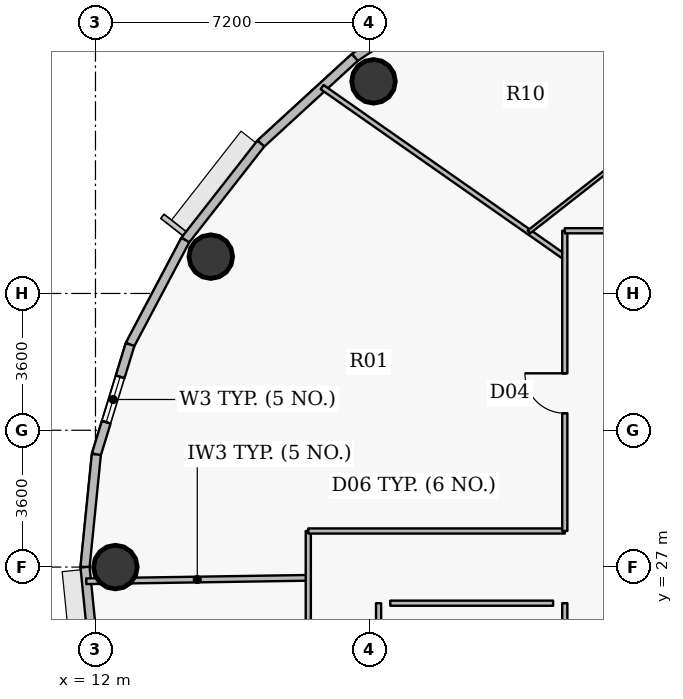
"""IFC4 building model, lengths in metres.
Left out: names, types, materials, properties, quantities, classifications, styles, units other than length and angle.
Written with IfcOpenShell. Run it as: python <this file> out.ifc"""

import sys

from ifc_helpers import new_model, si_unit, direction, frame, frame_2d, origin, origin_2d, place, context, subcontext, project, spatial, rectangle, hollow_circle, extrude, source, transform, mapped, element, fill, save


model = new_model("IFC4")
c1 = context("Model", 3, precision=1e-05, world=origin(), true_north=direction((0.0, 1.0)))
c2 = subcontext(c1, "Body", "Model", "MODEL_VIEW")
j1 = project(units=[si_unit("LENGTHUNIT", "METRE"), si_unit("PLANEANGLEUNIT", "RADIAN")], contexts=[c1])
p1 = place(None, origin())
s1 = spatial("IfcSite", under=j1, at=p1, CompositionType="ELEMENT")
p2 = place(p1, origin())
s2 = spatial("IfcBuilding", under=s1, at=p2, CompositionType="ELEMENT")
p3 = place(p2, frame((0.0, 0.0, 255.3)))
s3 = spatial("IfcBuildingStorey", under=s2, at=p3, CompositionType="ELEMENT", Elevation=255.3)
for number, where, z_axis, x_axis in (
    (1, (19.317, 39.781, 0.0), (0.0, 0.0, 1.0), (1.0, 0.0, 0.0)),
    (2, (15.035, 35.169, 0.0), (0.0, 0.0, 1.0), (1.0, 0.0, 0.0)),
    (3, (12.525, 27.0, 0.0), (0.0, 0.0, 1.0), (1.0, 0.0, 0.0)),
):
    element("IfcColumn", number, at=place(p3, frame(where, z_axis=z_axis, x_axis=x_axis)), inside=s3, PredefinedType="COLUMN", context=c2, shape_type="SweptSolid", body=[
        extrude(hollow_circle(Radius=0.575, WallThickness=0.036, at=origin_2d()), origin(), (0.0, 0.0, 1.0), 3.75),
    ])
p4 = place(p3, frame((18.824, 40.411, 0.0), z_axis=(0.0, 0.0, 1.0), x_axis=(0.831262496074, 0.555880079352, 0.0)))
e4 = element("IfcWall", 4, at=p4, inside=s3, PredefinedType="SOLIDWALL", context=c2, shape_type="SweptSolid", body=[
    extrude(rectangle(XDim=3.484, YDim=0.24, at=frame_2d((1.742, 0.0))), origin(), (0.0, 0.0, 1.0), 3.5),
])
p5 = place(p3, frame((16.352, 38.145, 0.0), z_axis=(0.0, 0.0, 1.0), x_axis=(0.737123922599, 0.675757591694, 0.0)))
e5 = element("IfcWall", 5, at=p5, inside=s3, PredefinedType="SOLIDWALL", context=c2, shape_type="SweptSolid", body=[
    extrude(rectangle(XDim=3.354, YDim=0.24, at=frame_2d((1.677, 0.0))), origin(), (0.0, 0.0, 1.0), 3.5),
])
p6 = place(p3, frame((14.364, 35.605, 0.0), z_axis=(0.0, 0.0, 1.0), x_axis=(0.616312344705, 0.787501805562, 0.0)))
e6 = element("IfcWall", 6, at=p6, inside=s3, PredefinedType="SOLIDWALL", context=c2, shape_type="SweptSolid", body=[
    extrude(rectangle(XDim=3.225, YDim=0.24, at=frame_2d((1.612, 0.0))), origin(), (0.0, 0.0, 1.0), 3.5),
])
p7 = place(p3, frame((12.91, 32.856, 0.0), z_axis=(0.0, 0.0, 1.0), x_axis=(0.46766049993, 0.883908172157, 0.0)))
e7 = element("IfcWall", 7, at=p7, inside=s3, PredefinedType="SOLIDWALL", context=c2, shape_type="SweptSolid", body=[
    extrude(rectangle(XDim=3.11, YDim=0.24, at=frame_2d((1.555, 0.0))), origin(), (0.0, 0.0, 1.0), 3.5),
])
p8 = place(p3, frame((12.023, 29.964, 0.0), z_axis=(0.0, 0.0, 1.0), x_axis=(0.293132907334, 0.95607170162, 0.0)))
e8 = element("IfcWall", 8, at=p8, inside=s3, PredefinedType="SOLIDWALL", context=c2, shape_type="SweptSolid", body=[
    extrude(rectangle(XDim=3.025, YDim=0.24, at=frame_2d((1.512, 0.0))), origin(), (0.0, 0.0, 1.0), 3.5),
])
p9 = place(p8, frame((0.887, 0.0, 0.9)))
e9 = element("IfcOpeningElement", 9, at=p9, cuts=e8, PredefinedType="OPENING", context=c2, shape_type="SweptSolid", body=[
    extrude(rectangle(XDim=1.25, YDim=1.65, at=origin_2d()), frame((0.625, 0.13, 0.825), z_axis=(0.0, -1.0, 0.0), x_axis=(1.0, 0.0, 0.0)), (0.0, 0.0, 1.0), 0.26),
])
for number, where, z_axis, x_axis in (
    (10, (11.725, 27.0, 0.0), (0.0, 0.0, 1.0), (0.1, 0.995, 0.0)),
    (11, (12.023, 24.036, 0.0), (0.0, 0.0, 1.0), (-0.1, 0.995, 0.0)),
):
    element("IfcWall", number, at=place(p3, frame(where, z_axis=z_axis, x_axis=x_axis)), inside=s3, PredefinedType="SOLIDWALL", context=c2, shape_type="SweptSolid", body=[
        extrude(rectangle(XDim=2.979, YDim=0.24, at=frame_2d((1.489, 0.0))), origin(), (0.0, 0.0, 1.0), 3.5),
    ])
p10 = place(p3, frame((11.757, 26.628, 0.0), z_axis=(0.0, 0.0, 1.0), x_axis=(0.999882437841, 0.015333313333, 0.0)))
e12 = element("IfcWall", 12, at=p10, inside=s3, PredefinedType="PARTITIONING", context=c2, shape_type="SweptSolid", body=[
    extrude(rectangle(XDim=5.844, YDim=0.15, at=frame_2d((2.922, 0.0))), origin(), (0.0, 0.0, 1.0), 2.985),
])
p11 = place(p3, frame((17.6, 23.423, 0.0), z_axis=(0.0, 0.0, 1.0), x_axis=(0.0, 1.0, 0.0)))
e13 = element("IfcWall", 13, at=p11, inside=s3, PredefinedType="PARTITIONING", context=c2, shape_type="SweptSolid", body=[
    extrude(rectangle(XDim=4.527, YDim=0.135, at=frame_2d((2.263, 0.0))), origin(), (0.0, 0.0, 1.0), 2.935),
])
p12 = place(p11, frame((1.257, 0.0, 0.0)))
e14 = element("IfcOpeningElement", 14, at=p12, cuts=e13, PredefinedType="OPENING", context=c2, shape_type="SweptSolid", body=[
    extrude(rectangle(XDim=0.82, YDim=2.1, at=origin_2d()), frame((0.41, 0.078, 1.05), z_axis=(0.0, -1.0, 0.0), x_axis=(1.0, 0.0, 0.0)), (0.0, 0.0, 1.0), 0.155),
])
p13 = place(p3, frame((17.6, 27.95, 0.0), z_axis=(0.0, 0.0, 1.0), x_axis=(1.0, 0.0, 0.0)))
e15 = element("IfcWall", 15, at=p13, inside=s3, PredefinedType="PARTITIONING", context=c2, shape_type="SweptSolid", body=[
    extrude(rectangle(XDim=6.75, YDim=0.135, at=frame_2d((3.375, 0.0))), origin(), (0.0, 0.0, 1.0), 3.5),
])
p14 = place(p3, frame((17.964, 39.629, 0.0), z_axis=(0.0, 0.0, 1.0), x_axis=(0.819162769896, -0.573561118292, 0.0)))
e16 = element("IfcWall", 16, at=p14, inside=s3, PredefinedType="PARTITIONING", context=c2, shape_type="SweptSolid", body=[
    extrude(rectangle(XDim=7.796, YDim=0.135, at=frame_2d((3.898, 0.0))), origin(), (0.0, 0.0, 1.0), 2.985),
])
p15 = place(p3, frame((23.406, 35.819, 0.0), z_axis=(0.0, 0.0, 1.0), x_axis=(0.787387506959, 0.616458363465, 0.0)))
e17 = element("IfcWall", 17, at=p15, inside=s3, PredefinedType="PARTITIONING", context=c2, shape_type="SweptSolid", body=[
    extrude(rectangle(XDim=3.245, YDim=0.1, at=frame_2d((1.623, 0.0))), origin(), (0.0, 0.0, 1.0), 2.935),
])
p16 = place(p3, frame((24.35, 27.95, 0.0), z_axis=(0.0, 0.0, 1.0), x_axis=(0.0, 1.0, 0.0)))
e18 = element("IfcWall", 18, at=p16, inside=s3, PredefinedType="PARTITIONING", context=c2, shape_type="SweptSolid", body=[
    extrude(rectangle(XDim=7.9, YDim=0.135, at=frame_2d((3.95, 0.0))), origin(), (0.0, 0.0, 1.0), 2.935),
])
p17 = place(p16, frame((3.099, 0.0, 0.0)))
e19 = element("IfcOpeningElement", 19, at=p17, cuts=e18, PredefinedType="OPENING", context=c2, shape_type="SweptSolid", body=[
    extrude(rectangle(XDim=1.05, YDim=2.15, at=origin_2d()), frame((0.525, 0.078, 1.075), z_axis=(0.0, -1.0, 0.0), x_axis=(1.0, 0.0, 0.0)), (0.0, 0.0, 1.0), 0.155),
])
p18 = place(p3, frame((24.35, 35.85, 0.0), z_axis=(0.0, 0.0, 1.0), x_axis=(1.0, 0.0, 0.0)))
e20 = element("IfcWall", 20, at=p18, inside=s3, PredefinedType="PARTITIONING", context=c2, shape_type="SweptSolid", body=[
    extrude(rectangle(XDim=26.218, YDim=0.135, at=frame_2d((13.109, 0.0))), origin(), (0.0, 0.0, 1.0), 2.935),
])
p19 = place(p18, frame((8.045, 0.0, 0.0)))
e21 = element("IfcOpeningElement", 21, at=p19, cuts=e20, PredefinedType="OPENING", context=c2, shape_type="SweptSolid", body=[
    extrude(rectangle(XDim=1.0, YDim=2.15, at=origin_2d()), frame((0.5, 0.078, 1.075), z_axis=(0.0, -1.0, 0.0), x_axis=(1.0, 0.0, 0.0)), (0.0, 0.0, 1.0), 0.155),
])
p20 = place(p3, frame((25.086, 43.95, 0.0), z_axis=(0.0, 0.0, 1.0), x_axis=(0.54137931016, -0.840778474112, 0.0)))
e22 = element("IfcWall", 22, at=p20, inside=s3, PredefinedType="PARTITIONING", context=c2, shape_type="SweptSolid", body=[
    extrude(rectangle(XDim=6.131, YDim=0.1, at=frame_2d((3.066, 0.0))), origin(), (0.0, 0.0, 1.0), 2.985),
])
p21 = place(p20, frame((2.615, 0.0, 0.0)))
e23 = element("IfcOpeningElement", 23, at=p21, cuts=e22, PredefinedType="OPENING", context=c2, shape_type="SweptSolid", body=[
    extrude(rectangle(XDim=0.9, YDim=2.1, at=origin_2d()), frame((0.45, 0.06, 1.05), z_axis=(0.0, -1.0, 0.0), x_axis=(1.0, 0.0, 0.0)), (0.0, 0.0, 1.0), 0.12),
])
p22 = place(p3, frame((19.45, 26.05, 0.0), z_axis=(0.0, 0.0, 1.0), x_axis=(0.0, -1.0, 0.0)))
e24 = element("IfcWall", 24, at=p22, inside=s3, PredefinedType="PARTITIONING", context=c2, shape_type="SweptSolid", body=[
    extrude(rectangle(XDim=2.257, YDim=0.135, at=frame_2d((1.128, 0.0))), origin(), (0.0, 0.0, 1.0), 3.5),
])
p23 = place(p3, frame((24.35, 24.745, 0.0), z_axis=(0.0, 0.0, 1.0), x_axis=(0.0, 1.0, 0.0)))
e25 = element("IfcWall", 25, at=p23, inside=s3, PredefinedType="PARTITIONING", context=c2, shape_type="SweptSolid", body=[
    extrude(rectangle(XDim=1.305, YDim=0.135, at=frame_2d((0.652, 0.0))), origin(), (0.0, 0.0, 1.0), 3.5),
])
p24 = place(p3, frame((24.042, 26.05, 0.0), z_axis=(0.0, 0.0, 1.0), x_axis=(-1.0, 0.0, 0.0)))
e26 = element("IfcWall", 26, at=p24, inside=s3, PredefinedType="PARTITIONING", context=c2, shape_type="SweptSolid", body=[
    extrude(rectangle(XDim=4.285, YDim=0.135, at=frame_2d((2.143, 0.0))), origin(), (0.0, 0.0, 1.0), 3.5),
])
m1 = source(origin(), c2, "Body", "SweptSolid", [
    extrude(rectangle(XDim=1.25, YDim=1.65, at=origin_2d()), frame((0.625, 0.03, 0.825), z_axis=(0.0, -1.0, 0.0), x_axis=(1.0, 0.0, 0.0)), (0.0, 0.0, 1.0), 0.06),
])
p25 = place(p9, origin())
e27 = element("IfcWindow", 27, at=p25, inside=s3, PartitioningType="SINGLE_PANEL", PredefinedType="WINDOW", context=c2, shape_type="MappedRepresentation", body=[
    mapped(m1, transform((0.0, 0.0, 0.0), x_axis=(1.0, 0.0, 0.0), y_axis=(0.0, 1.0, 0.0), z_axis=(0.0, 0.0, 1.0), scale=1.0)),
])
fill(e9, e27)
m2 = source(origin(), c2, "Body", "SweptSolid", [
    extrude(rectangle(XDim=1.05, YDim=2.15, at=origin_2d()), frame((0.525, 0.025, 1.075), z_axis=(0.0, -1.0, 0.0), x_axis=(1.0, 0.0, 0.0)), (0.0, 0.0, 1.0), 0.05),
])
p26 = place(p17, origin())
e28 = element("IfcDoor", 28, at=p26, inside=s3, OperationType="SINGLE_SWING_RIGHT", PredefinedType="DOOR", context=c2, shape_type="MappedRepresentation", body=[
    mapped(m2, transform((0.0, 0.0, 0.0), x_axis=(1.0, 0.0, 0.0), y_axis=(0.0, 1.0, 0.0), z_axis=(0.0, 0.0, 1.0), scale=1.0)),
])
fill(e19, e28)
save(model, sys.argv[1])
